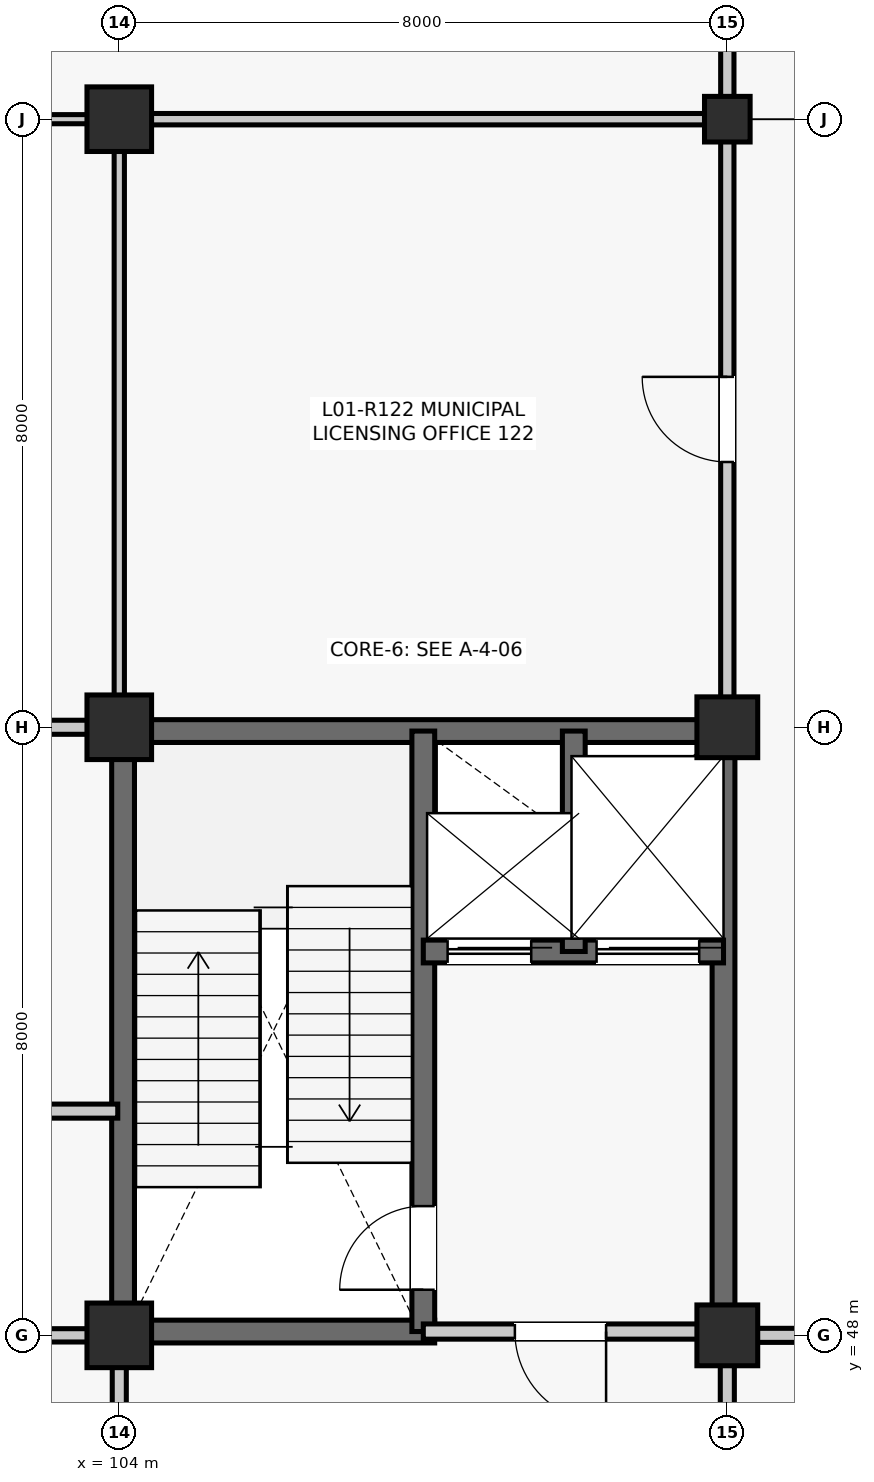
"""IFC4 building model, lengths in metres.
Left out: names, types, materials, properties, quantities, classifications, styles, units other than length and angle.
Written with IfcOpenShell. Run it as: python <this file> out.ifc"""

import sys

from ifc_helpers import new_model, si_unit, direction, frame, frame_2d, origin, origin_2d, place, context, subcontext, project, spatial, rectangle, extrude, element, fill, save


model = new_model("IFC4")
c1 = context("Model", 3, precision=1e-05, world=origin(), true_north=direction((0.0, 1.0)))
c2 = subcontext(c1, "Body", "Model", "MODEL_VIEW")
j1 = project(units=[si_unit("LENGTHUNIT", "METRE"), si_unit("PLANEANGLEUNIT", "RADIAN")], contexts=[c1])
p1 = place(None, origin())
s1 = spatial("IfcSite", under=j1, at=p1, CompositionType="ELEMENT")
p2 = place(p1, origin())
s2 = spatial("IfcBuilding", under=s1, at=p2, CompositionType="ELEMENT")
p3 = place(p2, frame((0.0, 0.0, 5.28)))
s3 = spatial("IfcBuildingStorey", under=s2, at=p3, CompositionType="ELEMENT", Elevation=5.28)
for number, where, z_axis, x_axis in (
    (1, (104.0, 48.0, 0.0), (0.0, 0.0, 1.0), (1.0, 0.0, 0.0)),
    (2, (104.0, 56.0, 0.0), (0.0, 0.0, 1.0), (1.0, 0.0, 0.0)),
    (3, (104.0, 64.0, 0.0), (0.0, 0.0, 1.0), (1.0, 0.0, 0.0)),
):
    element("IfcColumn", number, at=place(p3, frame(where, z_axis=z_axis, x_axis=x_axis)), inside=s3, PredefinedType="COLUMN", context=c2, shape_type="SweptSolid", body=[
        extrude(rectangle(XDim=0.85, YDim=0.85, at=origin_2d()), origin(), (0.0, 0.0, 1.0), 4.62),
    ])
for number, where, z_axis, x_axis in (
    (4, (112.0, 48.0, 0.0), (0.0, 0.0, 1.0), (1.0, 0.0, 0.0)),
    (5, (112.0, 56.0, 0.0), (0.0, 0.0, 1.0), (1.0, 0.0, 0.0)),
):
    element("IfcColumn", number, at=place(p3, frame(where, z_axis=z_axis, x_axis=x_axis)), inside=s3, PredefinedType="COLUMN", context=c2, shape_type="SweptSolid", body=[
        extrude(rectangle(XDim=0.8, YDim=0.8, at=origin_2d()), origin(), (0.0, 0.0, 1.0), 4.62),
    ])
p4 = place(p3, frame((112.0, 64.0, 0.0), z_axis=(0.0, 0.0, 1.0), x_axis=(1.0, 0.0, 0.0)))
e6 = element("IfcColumn", 6, at=p4, inside=s3, PredefinedType="COLUMN", context=c2, shape_type="SweptSolid", body=[
    extrude(rectangle(XDim=0.6, YDim=0.6, at=origin_2d()), origin(), (0.0, 0.0, 1.0), 4.62),
])
p5 = place(p3, frame((104.05, 48.315, 0.0), z_axis=(0.0, 0.0, 1.0), x_axis=(0.0, 1.0, 0.0)))
e7 = element("IfcWall", 7, at=p5, inside=s3, PredefinedType="SHEAR", context=c2, shape_type="SweptSolid", body=[
    extrude(rectangle(XDim=7.37, YDim=0.3, at=frame_2d((3.685, 0.0))), origin(), (0.0, 0.0, 1.0), 4.335),
])
p6 = place(p3, frame((104.315, 55.95, 0.0), z_axis=(0.0, 0.0, 1.0), x_axis=(1.0, 0.0, 0.0)))
e8 = element("IfcWall", 8, at=p6, inside=s3, PredefinedType="SHEAR", context=c2, shape_type="SweptSolid", body=[
    extrude(rectangle(XDim=7.395, YDim=0.3, at=frame_2d((3.698, 0.0))), origin(), (0.0, 0.0, 1.0), 4.335),
])
p7 = place(p3, frame((111.95, 48.29, 0.0), z_axis=(0.0, 0.0, 1.0), x_axis=(0.0, 1.0, 0.0)))
e9 = element("IfcWall", 9, at=p7, inside=s3, PredefinedType="SHEAR", context=c2, shape_type="SweptSolid", body=[
    extrude(rectangle(XDim=7.42, YDim=0.3, at=frame_2d((3.71, 0.0))), origin(), (0.0, 0.0, 1.0), 4.335),
])
p8 = place(p3, frame((104.315, 48.05, 0.0), z_axis=(0.0, 0.0, 1.0), x_axis=(1.0, 0.0, 0.0)))
e10 = element("IfcWall", 10, at=p8, inside=s3, PredefinedType="SHEAR", context=c2, shape_type="SweptSolid", body=[
    extrude(rectangle(XDim=3.835, YDim=0.3, at=frame_2d((1.917, 0.0))), origin(), (0.0, 0.0, 1.0), 4.335),
])
p9 = place(p3, frame((108.0, 48.05, 0.0), z_axis=(0.0, 0.0, 1.0), x_axis=(0.0, 1.0, 0.0)))
e11 = element("IfcWall", 11, at=p9, inside=s3, PredefinedType="SHEAR", context=c2, shape_type="SweptSolid", body=[
    extrude(rectangle(XDim=7.9, YDim=0.3, at=frame_2d((3.95, 0.0))), origin(), (0.0, 0.0, 1.0), 4.335),
])
p10 = place(p9, frame((0.55, 0.0, 0.0)))
e12 = element("IfcOpeningElement", 12, at=p10, cuts=e11, PredefinedType="OPENING", context=c2, shape_type="SweptSolid", body=[
    extrude(rectangle(XDim=1.1, YDim=2.15, at=frame_2d((0.55, 1.075))), frame((0.0, 0.16, 0.0), z_axis=(0.0, -1.0, 0.0), x_axis=(1.0, 0.0, 0.0)), (0.0, 0.0, 1.0), 0.32),
])
p11 = place(p3, frame((108.0, 53.05, 0.0), z_axis=(0.0, 0.0, 1.0), x_axis=(1.0, 0.0, 0.0)))
e13 = element("IfcWall", 13, at=p11, inside=s3, PredefinedType="SHEAR", context=c2, shape_type="SweptSolid", body=[
    extrude(rectangle(XDim=3.95, YDim=0.3, at=frame_2d((1.975, 0.0))), origin(), (0.0, 0.0, 1.0), 4.335),
])
p12 = place(p11, frame((0.32, 0.0, 0.0)))
e14 = element("IfcOpeningElement", 14, at=p12, cuts=e13, PredefinedType="OPENING", context=c2, shape_type="SweptSolid", body=[
    extrude(rectangle(XDim=1.1, YDim=2.2, at=frame_2d((0.55, 1.1))), frame((0.0, 0.16, 0.0), z_axis=(0.0, -1.0, 0.0), x_axis=(1.0, 0.0, 0.0)), (0.0, 0.0, 1.0), 0.32),
])
p13 = place(p11, frame((2.28, 0.0, 0.0)))
e15 = element("IfcOpeningElement", 15, at=p13, cuts=e13, PredefinedType="OPENING", context=c2, shape_type="SweptSolid", body=[
    extrude(rectangle(XDim=1.35, YDim=2.3, at=frame_2d((0.675, 1.15))), frame((0.0, 0.16, 0.0), z_axis=(0.0, -1.0, 0.0), x_axis=(1.0, 0.0, 0.0)), (0.0, 0.0, 1.0), 0.32),
])
p14 = place(p3, frame((109.98, 53.05, 0.0), z_axis=(0.0, 0.0, 1.0), x_axis=(0.0, 1.0, 0.0)))
e16 = element("IfcWall", 16, at=p14, inside=s3, PredefinedType="SHEAR", context=c2, shape_type="SweptSolid", body=[
    extrude(rectangle(XDim=2.9, YDim=0.3, at=frame_2d((1.45, 0.0))), origin(), (0.0, 0.0, 1.0), 4.335),
])
p15 = place(p3, frame((108.0, 48.05, 0.0), z_axis=(0.0, 0.0, 1.0), x_axis=(1.0, 0.0, 0.0)))
e17 = element("IfcWall", 17, at=p15, inside=s3, PredefinedType="PARTITIONING", context=c2, shape_type="SweptSolid", body=[
    extrude(rectangle(XDim=3.61, YDim=0.2, at=frame_2d((1.805, 0.0))), origin(), (0.0, 0.0, 1.0), 3.781),
])
p16 = place(p15, frame((1.205, 0.0, 0.0)))
e18 = element("IfcOpeningElement", 18, at=p16, cuts=e17, PredefinedType="OPENING", context=c2, shape_type="SweptSolid", body=[
    extrude(rectangle(XDim=1.2, YDim=2.15, at=frame_2d((0.6, 1.075))), frame((0.0, 0.11, 0.0), z_axis=(0.0, -1.0, 0.0), x_axis=(1.0, 0.0, 0.0)), (0.0, 0.0, 1.0), 0.22),
])
p17 = place(p3, frame((98.9, 50.95, 0.0), z_axis=(0.0, 0.0, 1.0), x_axis=(1.0, 0.0, 0.0)))
e19 = element("IfcWall", 19, at=p17, inside=s3, PredefinedType="PARTITIONING", context=c2, shape_type="SweptSolid", body=[
    extrude(rectangle(XDim=5.08, YDim=0.185, at=frame_2d((2.54, 0.0))), origin(), (0.0, 0.0, 1.0), 3.851),
])
p18 = place(p17, frame((2.06, 0.0, 0.0)))
e20 = element("IfcOpeningElement", 20, at=p18, cuts=e19, PredefinedType="OPENING", context=c2, shape_type="SweptSolid", body=[
    extrude(rectangle(XDim=0.96, YDim=2.14, at=frame_2d((0.48, 1.07))), frame((0.0, 0.103, 0.0), z_axis=(0.0, -1.0, 0.0), x_axis=(1.0, 0.0, 0.0)), (0.0, 0.0, 1.0), 0.205),
])
p19 = place(p3, frame((104.0, 40.415, 0.0), z_axis=(0.0, 0.0, 1.0), x_axis=(0.0, 1.0, 0.0)))
e21 = element("IfcWall", 21, at=p19, inside=s3, PredefinedType="PARTITIONING", context=c2, shape_type="SweptSolid", body=[
    extrude(rectangle(XDim=7.17, YDim=0.185, at=frame_2d((3.585, 0.0))), origin(), (0.0, 0.0, 1.0), 3.781),
])
p20 = place(p19, frame((2.785, 0.0, 0.0)))
e22 = element("IfcOpeningElement", 22, at=p20, cuts=e21, PredefinedType="OPENING", context=c2, shape_type="SweptSolid", body=[
    extrude(rectangle(XDim=1.6, YDim=2.25, at=frame_2d((0.8, 1.125))), frame((0.0, 0.103, 0.0), z_axis=(0.0, -1.0, 0.0), x_axis=(1.0, 0.0, 0.0)), (0.0, 0.0, 1.0), 0.205),
])
p21 = place(p3, frame((96.177, 48.0, 0.0), z_axis=(0.0, 0.0, 1.0), x_axis=(1.0, 0.0, 0.0)))
e23 = element("IfcWall", 23, at=p21, inside=s3, PredefinedType="PARTITIONING", context=c2, shape_type="SweptSolid", body=[
    extrude(rectangle(XDim=7.408, YDim=0.175, at=frame_2d((3.704, 0.0))), origin(), (0.0, 0.0, 1.0), 3.771),
])
p22 = place(p21, frame((2.754, 0.0, 0.0)))
e24 = element("IfcOpeningElement", 24, at=p22, cuts=e23, PredefinedType="OPENING", context=c2, shape_type="SweptSolid", body=[
    extrude(rectangle(XDim=1.9, YDim=2.38, at=frame_2d((0.95, 1.19))), frame((0.0, 0.097, 0.0), z_axis=(0.0, -1.0, 0.0), x_axis=(1.0, 0.0, 0.0)), (0.0, 0.0, 1.0), 0.195),
])
p23 = place(p3, frame((96.177, 56.0, 0.0), z_axis=(0.0, 0.0, 1.0), x_axis=(1.0, 0.0, 0.0)))
e25 = element("IfcWall", 25, at=p23, inside=s3, PredefinedType="PARTITIONING", context=c2, shape_type="SweptSolid", body=[
    extrude(rectangle(XDim=7.408, YDim=0.185, at=frame_2d((3.704, 0.0))), origin(), (0.0, 0.0, 1.0), 3.781),
])
p24 = place(p23, frame((0.52, 0.0, 0.0)))
e26 = element("IfcOpeningElement", 26, at=p24, cuts=e25, PredefinedType="OPENING", context=c2, shape_type="SweptSolid", body=[
    extrude(rectangle(XDim=0.94, YDim=2.12, at=frame_2d((0.47, 1.06))), frame((0.0, 0.103, 0.0), z_axis=(0.0, -1.0, 0.0), x_axis=(1.0, 0.0, 0.0)), (0.0, 0.0, 1.0), 0.205),
])
p25 = place(p3, frame((104.0, 56.415, 0.0), z_axis=(0.0, 0.0, 1.0), x_axis=(0.0, 1.0, 0.0)))
e27 = element("IfcWall", 27, at=p25, inside=s3, PredefinedType="PARTITIONING", context=c2, shape_type="SweptSolid", body=[
    extrude(rectangle(XDim=7.17, YDim=0.135, at=frame_2d((3.585, 0.0))), origin(), (0.0, 0.0, 1.0), 3.787),
])
p26 = place(p3, frame((96.177, 64.0, 0.0), z_axis=(0.0, 0.0, 1.0), x_axis=(1.0, 0.0, 0.0)))
e28 = element("IfcWall", 28, at=p26, inside=s3, PredefinedType="PARTITIONING", context=c2, shape_type="SweptSolid", body=[
    extrude(rectangle(XDim=7.408, YDim=0.12, at=frame_2d((3.704, 0.0))), origin(), (0.0, 0.0, 1.0), 3.712),
])
p27 = place(p3, frame((112.0, 40.29, 0.0), z_axis=(0.0, 0.0, 1.0), x_axis=(0.0, 1.0, 0.0)))
e29 = element("IfcWall", 29, at=p27, inside=s3, PredefinedType="PARTITIONING", context=c2, shape_type="SweptSolid", body=[
    extrude(rectangle(XDim=7.32, YDim=0.185, at=frame_2d((3.66, 0.0))), origin(), (0.0, 0.0, 1.0), 3.851),
])
p28 = place(p27, frame((3.01, 0.0, 0.0)))
e30 = element("IfcOpeningElement", 30, at=p28, cuts=e29, PredefinedType="OPENING", context=c2, shape_type="SweptSolid", body=[
    extrude(rectangle(XDim=1.3, YDim=2.2, at=frame_2d((0.65, 1.1))), frame((0.0, 0.103, 0.0), z_axis=(0.0, -1.0, 0.0), x_axis=(1.0, 0.0, 0.0)), (0.0, 0.0, 1.0), 0.205),
])
p29 = place(p3, frame((112.0, 56.39, 0.0), z_axis=(0.0, 0.0, 1.0), x_axis=(0.0, 1.0, 0.0)))
e31 = element("IfcWall", 31, at=p29, inside=s3, PredefinedType="PARTITIONING", context=c2, shape_type="SweptSolid", body=[
    extrude(rectangle(XDim=7.32, YDim=0.175, at=frame_2d((3.66, 0.0))), origin(), (0.0, 0.0, 1.0), 3.857),
])
p30 = place(p29, frame((3.1, 0.0, 0.0)))
e32 = element("IfcOpeningElement", 32, at=p30, cuts=e31, PredefinedType="OPENING", context=c2, shape_type="SweptSolid", body=[
    extrude(rectangle(XDim=1.12, YDim=2.22, at=frame_2d((0.56, 1.11))), frame((0.0, 0.097, 0.0), z_axis=(0.0, -1.0, 0.0), x_axis=(1.0, 0.0, 0.0)), (0.0, 0.0, 1.0), 0.195),
])
p31 = place(p3, frame((104.415, 64.0, 0.0), z_axis=(0.0, 0.0, 1.0), x_axis=(1.0, 0.0, 0.0)))
e33 = element("IfcWall", 33, at=p31, inside=s3, PredefinedType="PARTITIONING", context=c2, shape_type="SweptSolid", body=[
    extrude(rectangle(XDim=7.295, YDim=0.15, at=frame_2d((3.647, 0.0))), origin(), (0.0, 0.0, 1.0), 3.787),
])
p32 = place(p3, frame((112.0, 64.29, 0.0), z_axis=(0.0, 0.0, 1.0), x_axis=(0.0, 1.0, 0.0)))
e34 = element("IfcWall", 34, at=p32, inside=s3, PredefinedType="PARTITIONING", context=c2, shape_type="SweptSolid", body=[
    extrude(rectangle(XDim=7.42, YDim=0.175, at=frame_2d((3.71, 0.0))), origin(), (0.0, 0.0, 1.0), 3.781),
])
p33 = place(p32, frame((2.76, 0.0, 0.0)))
e35 = element("IfcOpeningElement", 35, at=p33, cuts=e34, PredefinedType="OPENING", context=c2, shape_type="SweptSolid", body=[
    extrude(rectangle(XDim=1.9, YDim=2.38, at=frame_2d((0.95, 1.19))), frame((0.0, 0.097, 0.0), z_axis=(0.0, -1.0, 0.0), x_axis=(1.0, 0.0, 0.0)), (0.0, 0.0, 1.0), 0.195),
])
p34 = place(p3, frame((112.39, 48.0, 0.0), z_axis=(0.0, 0.0, 1.0), x_axis=(1.0, 0.0, 0.0)))
e36 = element("IfcWall", 36, at=p34, inside=s3, PredefinedType="PARTITIONING", context=c2, shape_type="SweptSolid", body=[
    extrude(rectangle(XDim=7.32, YDim=0.185, at=frame_2d((3.66, 0.0))), origin(), (0.0, 0.0, 1.0), 3.712),
])
p35 = place(p34, frame((3.01, 0.0, 0.0)))
e37 = element("IfcOpeningElement", 37, at=p35, cuts=e36, PredefinedType="OPENING", context=c2, shape_type="SweptSolid", body=[
    extrude(rectangle(XDim=1.3, YDim=2.2, at=frame_2d((0.65, 1.1))), frame((0.0, 0.103, 0.0), z_axis=(0.0, -1.0, 0.0), x_axis=(1.0, 0.0, 0.0)), (0.0, 0.0, 1.0), 0.205),
])
p36 = place(p10, origin())
e38 = element("IfcDoor", 38, at=p36, inside=s3, OperationType="SINGLE_SWING_LEFT", PredefinedType="DOOR", context=c2, shape_type="SweptSolid", body=[
    extrude(rectangle(XDim=1.1, YDim=2.15, at=frame_2d((0.55, 1.075))), frame((0.0, 0.025, 0.0), z_axis=(0.0, -1.0, 0.0), x_axis=(1.0, 0.0, 0.0)), (0.0, 0.0, 1.0), 0.05),
])
fill(e12, e38)
p37 = place(p12, origin())
e39 = element("IfcDoor", 39, at=p37, inside=s3, OperationType="SLIDING_TO_LEFT", PredefinedType="DOOR", context=c2, shape_type="SweptSolid", body=[
    extrude(rectangle(XDim=1.1, YDim=2.2, at=frame_2d((0.55, 1.1))), frame((0.0, 0.025, 0.0), z_axis=(0.0, -1.0, 0.0), x_axis=(1.0, 0.0, 0.0)), (0.0, 0.0, 1.0), 0.05),
])
fill(e14, e39)
p38 = place(p13, origin())
e40 = element("IfcDoor", 40, at=p38, inside=s3, OperationType="DOUBLE_DOOR_SLIDING", PredefinedType="DOOR", context=c2, shape_type="SweptSolid", body=[
    extrude(rectangle(XDim=1.35, YDim=2.3, at=frame_2d((0.675, 1.15))), frame((0.0, 0.025, 0.0), z_axis=(0.0, -1.0, 0.0), x_axis=(1.0, 0.0, 0.0)), (0.0, 0.0, 1.0), 0.05),
])
fill(e15, e40)
p39 = place(p16, frame((1.2, 0.0, 0.0), z_axis=(0.0, 0.0, 1.0), x_axis=(-1.0, 0.0, 0.0)))
e41 = element("IfcDoor", 41, at=p39, inside=s3, OperationType="SINGLE_SWING_RIGHT", PredefinedType="DOOR", context=c2, shape_type="SweptSolid", body=[
    extrude(rectangle(XDim=1.2, YDim=2.15, at=frame_2d((0.6, 1.075))), frame((0.0, 0.025, 0.0), z_axis=(0.0, -1.0, 0.0), x_axis=(1.0, 0.0, 0.0)), (0.0, 0.0, 1.0), 0.05),
])
fill(e18, e41)
p40 = place(p30, origin())
e42 = element("IfcDoor", 42, at=p40, inside=s3, OperationType="SINGLE_SWING_RIGHT", PredefinedType="DOOR", context=c2, shape_type="SweptSolid", body=[
    extrude(rectangle(XDim=1.12, YDim=2.22, at=frame_2d((0.56, 1.11))), frame((0.0, 0.025, 0.0), z_axis=(0.0, -1.0, 0.0), x_axis=(1.0, 0.0, 0.0)), (0.0, 0.0, 1.0), 0.05),
])
fill(e32, e42)
save(model, sys.argv[1])
